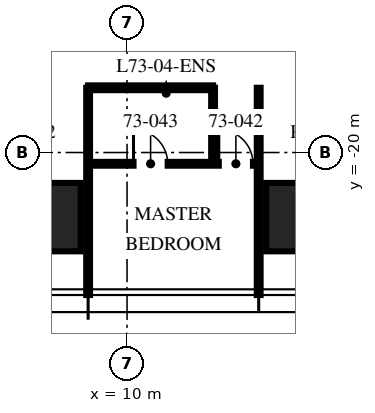
"""IFC4 building model, lengths in metres.
Left out: names, types, materials, properties, quantities, classifications, styles, units other than length and angle.
Written with IfcOpenShell. Run it as: python <this file> out.ifc"""

import sys

from ifc_helpers import new_model, si_unit, direction, frame, frame_2d, origin, origin_2d, place, context, subcontext, project, spatial, rectangle, extrude, element, fill, save


model = new_model("IFC4")
c1 = context("Model", 3, precision=1e-05, world=origin(), true_north=direction((0.0, 1.0)))
c2 = subcontext(c1, "Body", "Model", "MODEL_VIEW")
j1 = project(units=[si_unit("LENGTHUNIT", "METRE"), si_unit("PLANEANGLEUNIT", "RADIAN")], contexts=[c1])
p1 = place(None, origin())
s1 = spatial("IfcSite", under=j1, at=p1, CompositionType="ELEMENT")
p2 = place(p1, origin())
s2 = spatial("IfcBuilding", under=s1, at=p2, CompositionType="ELEMENT")
p3 = place(p2, frame((0.0, 0.0, 293.25)))
s3 = spatial("IfcBuildingStorey", under=s2, at=p3, CompositionType="ELEMENT", Elevation=293.25)
for number, where, z_axis, x_axis in (
    (1, (14.96, -21.7, 0.0), (0.0, 0.0, 1.0), (1.0, 0.0, 0.0)),
    (2, (7.48, -21.7, 0.0), (0.0, 0.0, 1.0), (1.0, 0.0, 0.0)),
):
    element("IfcColumn", number, at=place(p3, frame(where, z_axis=z_axis, x_axis=x_axis)), inside=s3, PredefinedType="COLUMN", context=c2, shape_type="SweptSolid", body=[
        extrude(rectangle(XDim=2.6, YDim=1.8, at=origin_2d()), origin(), (0.0, 0.0, 1.0), 3.75),
    ])
for number, where, z_axis, x_axis in (
    (3, (8.976, -18.296, 0.0), (0.0, 0.0, 1.0), (0.0, -1.0, 0.0)),
    (4, (13.464, -18.296, 0.0), (0.0, 0.0, 1.0), (0.0, -1.0, 0.0)),
):
    element("IfcWall", number, at=place(p3, frame(where, z_axis=z_axis, x_axis=x_axis)), inside=s3, PredefinedType="PARTITIONING", context=c2, shape_type="SweptSolid", body=[
        extrude(rectangle(XDim=5.454, YDim=0.1, at=frame_2d((2.727, 0.0))), origin(), (0.0, 0.0, 1.0), 3.01),
    ])
p4 = place(p3, frame((8.976, -20.296, 0.0), z_axis=(0.0, 0.0, 1.0), x_axis=(1.0, 0.0, 0.0)))
e5 = element("IfcWall", 5, at=p4, inside=s3, PredefinedType="PARTITIONING", context=c2, shape_type="SweptSolid", body=[
    extrude(rectangle(XDim=4.488, YDim=0.1, at=frame_2d((2.244, 0.0))), origin(), (0.0, 0.0, 1.0), 2.91),
])
p5 = place(p4, frame((3.438, 0.0, 0.0)))
e6 = element("IfcOpeningElement", 6, at=p5, cuts=e5, PredefinedType="OPENING", context=c2, shape_type="SweptSolid", body=[
    extrude(rectangle(XDim=0.9, YDim=2.1, at=frame_2d((0.45, 1.05))), frame((0.0, 0.06, 0.0), z_axis=(0.0, -1.0, 0.0), x_axis=(1.0, 0.0, 0.0)), (0.0, 0.0, 1.0), 0.12),
])
p6 = place(p4, frame((1.194, 0.0, 0.0)))
e7 = element("IfcOpeningElement", 7, at=p6, cuts=e5, PredefinedType="OPENING", context=c2, shape_type="SweptSolid", body=[
    extrude(rectangle(XDim=0.9, YDim=2.1, at=frame_2d((0.45, 1.05))), frame((0.0, 0.06, 0.0), z_axis=(0.0, -1.0, 0.0), x_axis=(1.0, 0.0, 0.0)), (0.0, 0.0, 1.0), 0.12),
])
p7 = place(p3, frame((12.264, -18.296, 0.0), z_axis=(0.0, 0.0, 1.0), x_axis=(0.0, -1.0, 0.0)))
e8 = element("IfcWall", 8, at=p7, inside=s3, PredefinedType="PARTITIONING", context=c2, shape_type="SweptSolid", body=[
    extrude(rectangle(XDim=2.0, YDim=0.1, at=frame_2d((1.0, 0.0))), origin(), (0.0, 0.0, 1.0), 3.5),
])
p8 = place(p3, frame((8.976, -18.296, 0.0), z_axis=(0.0, 0.0, 1.0), x_axis=(1.0, 0.0, 0.0)))
e9 = element("IfcWall", 9, at=p8, inside=s3, PredefinedType="PARTITIONING", context=c2, shape_type="SweptSolid", body=[
    extrude(rectangle(XDim=3.288, YDim=0.125, at=frame_2d((1.644, 0.0))), origin(), (0.0, 0.0, 1.0), 2.91),
])
p9 = place(p5, origin())
e10 = element("IfcDoor", 10, at=p9, inside=s3, OperationType="SINGLE_SWING_LEFT", PredefinedType="DOOR", context=c2, shape_type="SweptSolid", body=[
    extrude(rectangle(XDim=0.9, YDim=2.1, at=frame_2d((0.45, 1.05))), frame((0.0, 0.025, 0.0), z_axis=(0.0, -1.0, 0.0), x_axis=(1.0, 0.0, 0.0)), (0.0, 0.0, 1.0), 0.05),
])
fill(e6, e10)
p10 = place(p6, origin())
e11 = element("IfcDoor", 11, at=p10, inside=s3, OperationType="SINGLE_SWING_LEFT", PredefinedType="DOOR", context=c2, shape_type="SweptSolid", body=[
    extrude(rectangle(XDim=0.9, YDim=2.1, at=frame_2d((0.45, 1.05))), frame((0.0, 0.025, 0.0), z_axis=(0.0, -1.0, 0.0), x_axis=(1.0, 0.0, 0.0)), (0.0, 0.0, 1.0), 0.05),
])
fill(e7, e11)
save(model, sys.argv[1])
